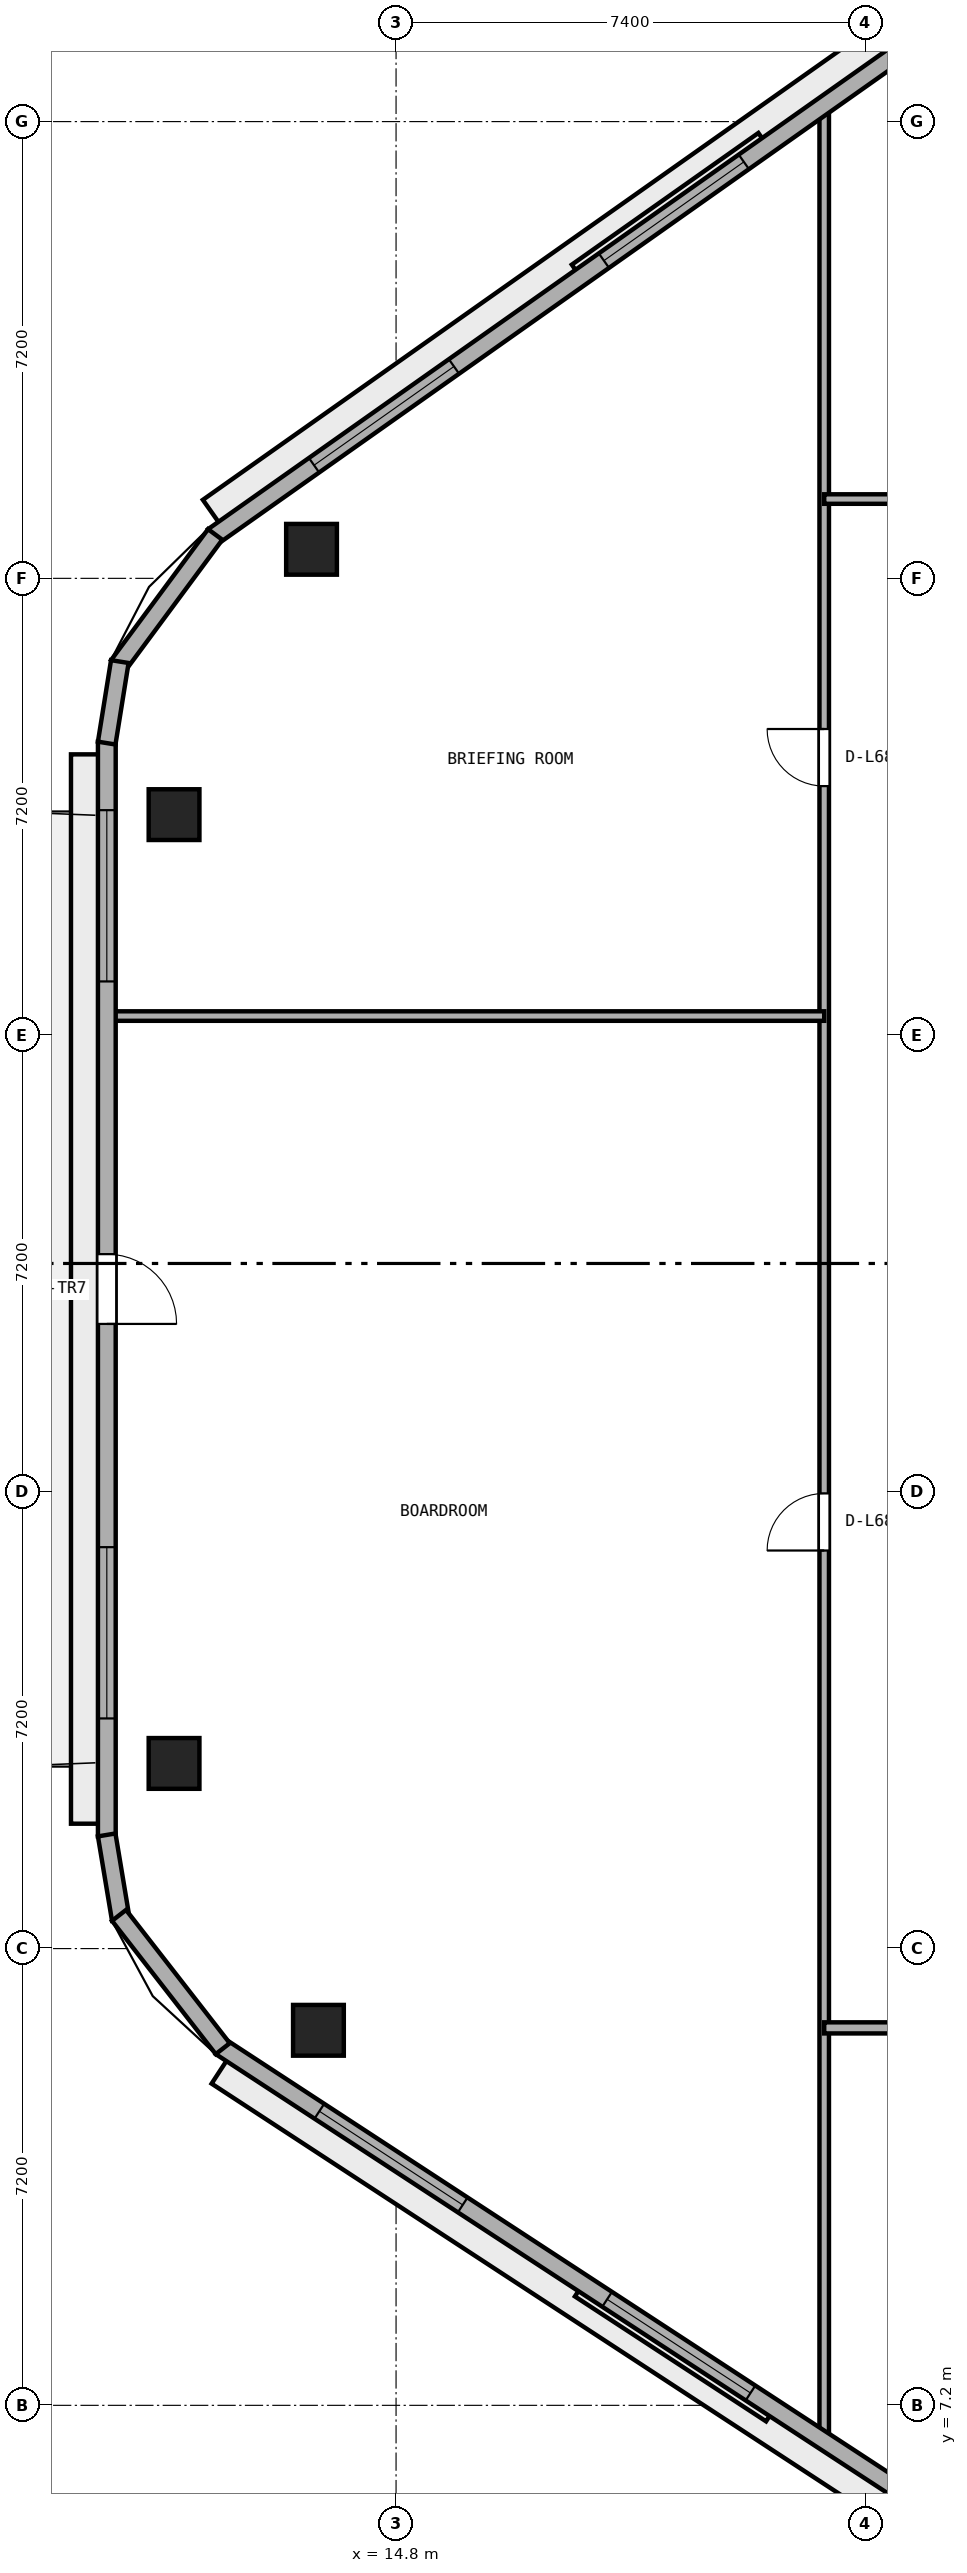
"""IFC4 building model, lengths in metres.
Left out: names, types, materials, properties, quantities, classifications, styles, units other than length and angle.
Written with IfcOpenShell. Run it as: python <this file> out.ifc"""

import sys

from ifc_helpers import new_model, si_unit, direction, frame, frame_2d, origin, origin_2d, place, context, subcontext, project, spatial, rectangle, extrude, element, fill, save


model = new_model("IFC4")
c1 = context("Model", 3, precision=1e-05, world=origin(), true_north=direction((0.0, 1.0)))
c2 = subcontext(c1, "Body", "Model", "MODEL_VIEW")
j1 = project(units=[si_unit("LENGTHUNIT", "METRE"), si_unit("PLANEANGLEUNIT", "RADIAN")], contexts=[c1])
p1 = place(None, origin())
s1 = spatial("IfcSite", under=j1, at=p1, CompositionType="ELEMENT")
p2 = place(p1, origin())
s2 = spatial("IfcBuilding", under=s1, at=p2, CompositionType="ELEMENT")
p3 = place(p2, frame((0.0, 0.0, 266.8)))
s3 = spatial("IfcBuildingStorey", under=s2, at=p3, CompositionType="ELEMENT", Elevation=266.8)
for number, where, z_axis, x_axis in (
    (1, (13.467, 36.458, 0.0), (0.0, 0.0, 1.0), (1.0, 0.0, 0.0)),
    (2, (11.3, 32.275, 0.0), (0.0, 0.0, 1.0), (1.0, 0.0, 0.0)),
    (3, (11.3, 17.319, 0.0), (0.0, 0.0, 1.0), (1.0, 0.0, 0.0)),
    (4, (13.576, 13.112, 0.0), (0.0, 0.0, 1.0), (1.0, 0.0, 0.0)),
):
    element("IfcColumn", number, at=place(p3, frame(where, z_axis=z_axis, x_axis=x_axis)), inside=s3, PredefinedType="COLUMN", context=c2, shape_type="SweptSolid", body=[
        extrude(rectangle(XDim=0.8, YDim=0.8, at=origin_2d()), origin(), (0.0, 0.0, 1.0), 3.8),
    ])
p4 = place(p3, frame((21.55, 6.608, 0.0), z_axis=(0.0, 0.0, 1.0), x_axis=(0.0, 1.0, 0.0)))
e5 = element("IfcWall", 5, at=p4, inside=s3, PredefinedType="PARTITIONING", context=c2, shape_type="SweptSolid", body=[
    extrude(rectangle(XDim=36.883, YDim=0.15, at=frame_2d((18.441, 0.0))), origin(), (0.0, 0.0, 1.0), 3.51),
])
p5 = place(p4, frame((14.067, 0.0, 0.0)))
e6 = element("IfcOpeningElement", 6, at=p5, cuts=e5, PredefinedType="OPENING", context=c2, shape_type="SweptSolid", body=[
    extrude(rectangle(XDim=0.9, YDim=2.1, at=frame_2d((0.45, 1.05))), frame((0.0, 0.085, 0.0), z_axis=(0.0, -1.0, 0.0), x_axis=(1.0, 0.0, 0.0)), (0.0, 0.0, 1.0), 0.17),
])
p6 = place(p4, frame((26.117, 0.0, 0.0)))
e7 = element("IfcOpeningElement", 7, at=p6, cuts=e5, PredefinedType="OPENING", context=c2, shape_type="SweptSolid", body=[
    extrude(rectangle(XDim=0.9, YDim=2.1, at=frame_2d((0.45, 1.05))), frame((0.0, 0.085, 0.0), z_axis=(0.0, -1.0, 0.0), x_axis=(1.0, 0.0, 0.0)), (0.0, 0.0, 1.0), 0.17),
])
p7 = place(p3, frame((21.55, 13.15, 0.0), z_axis=(0.0, 0.0, 1.0), x_axis=(1.0, 0.0, 0.0)))
e8 = element("IfcWall", 8, at=p7, inside=s3, PredefinedType="PARTITIONING", context=c2, shape_type="SweptSolid", body=[
    extrude(rectangle(XDim=14.1, YDim=0.175, at=frame_2d((7.05, 0.0))), origin(), (0.0, 0.0, 1.0), 3.51),
])
p8 = place(p7, frame((6.6, 0.0, 0.0)))
e9 = element("IfcOpeningElement", 9, at=p8, cuts=e8, PredefinedType="OPENING", context=c2, shape_type="SweptSolid", body=[
    extrude(rectangle(XDim=0.9, YDim=2.1, at=frame_2d((0.45, 1.05))), frame((0.0, 0.097, 0.0), z_axis=(0.0, -1.0, 0.0), x_axis=(1.0, 0.0, 0.0)), (0.0, 0.0, 1.0), 0.195),
])
p9 = place(p3, frame((10.305, 29.1, 0.0), z_axis=(0.0, 0.0, 1.0), x_axis=(1.0, 0.0, 0.0)))
e10 = element("IfcWall", 10, at=p9, inside=s3, PredefinedType="PARTITIONING", context=c2, shape_type="SweptSolid", body=[
    extrude(rectangle(XDim=11.245, YDim=0.15, at=frame_2d((5.623, 0.0))), origin(), (0.0, 0.0, 1.0), 3.51),
])
p10 = place(p3, frame((21.55, 37.25, 0.0), z_axis=(0.0, 0.0, 1.0), x_axis=(1.0, 0.0, 0.0)))
e11 = element("IfcWall", 11, at=p10, inside=s3, PredefinedType="PARTITIONING", context=c2, shape_type="SweptSolid", body=[
    extrude(rectangle(XDim=27.05, YDim=0.15, at=frame_2d((13.525, 0.0))), origin(), (0.0, 0.0, 1.0), 3.51),
])
p11 = place(p10, frame((4.795, 0.0, 0.0)))
e12 = element("IfcOpeningElement", 12, at=p11, cuts=e11, PredefinedType="OPENING", context=c2, shape_type="SweptSolid", body=[
    extrude(rectangle(XDim=1.0, YDim=2.12, at=frame_2d((0.5, 1.06))), frame((0.0, 0.085, 0.0), z_axis=(0.0, -1.0, 0.0), x_axis=(1.0, 0.0, 0.0)), (0.0, 0.0, 1.0), 0.17),
])
p12 = place(p10, frame((15.6, 0.0, 0.0)))
e13 = element("IfcOpeningElement", 13, at=p12, cuts=e11, PredefinedType="OPENING", context=c2, shape_type="SweptSolid", body=[
    extrude(rectangle(XDim=1.0, YDim=2.12, at=frame_2d((0.5, 1.06))), frame((0.0, 0.085, 0.0), z_axis=(0.0, -1.0, 0.0), x_axis=(1.0, 0.0, 0.0)), (0.0, 0.0, 1.0), 0.17),
])
p13 = place(p10, frame((23.88, 0.0, 0.0)))
e14 = element("IfcOpeningElement", 14, at=p13, cuts=e11, PredefinedType="OPENING", context=c2, shape_type="SweptSolid", body=[
    extrude(rectangle(XDim=0.9, YDim=2.1, at=frame_2d((0.45, 1.05))), frame((0.0, 0.085, 0.0), z_axis=(0.0, -1.0, 0.0), x_axis=(1.0, 0.0, 0.0)), (0.0, 0.0, 1.0), 0.17),
])
p14 = place(p3, frame((26.443, 46.913, 0.0), z_axis=(0.0, 0.0, 1.0), x_axis=(-0.817024179766, -0.576603407619, 0.0)))
e15 = element("IfcWall", 15, at=p14, inside=s3, PredefinedType="STANDARD", context=c2, shape_type="SweptSolid", body=[
    extrude(rectangle(XDim=17.78, YDim=0.28, at=frame_2d((8.89, 0.0))), origin(), (0.0, 0.0, 1.0), 3.51),
])
p15 = place(p14, frame((1.947, 0.0, 0.9)))
e16 = element("IfcOpeningElement", 16, at=p15, cuts=e15, PredefinedType="OPENING", context=c2, shape_type="SweptSolid", body=[
    extrude(rectangle(XDim=2.7, YDim=1.75, at=frame_2d((1.35, 0.875))), frame((0.0, 0.15, 0.0), z_axis=(0.0, -1.0, 0.0), x_axis=(1.0, 0.0, 0.0)), (0.0, 0.0, 1.0), 0.3),
])
p16 = place(p14, frame((7.54, 0.0, 0.9)))
e17 = element("IfcOpeningElement", 17, at=p16, cuts=e15, PredefinedType="OPENING", context=c2, shape_type="SweptSolid", body=[
    extrude(rectangle(XDim=2.7, YDim=1.75, at=frame_2d((1.35, 0.875))), frame((0.0, 0.15, 0.0), z_axis=(0.0, -1.0, 0.0), x_axis=(1.0, 0.0, 0.0)), (0.0, 0.0, 1.0), 0.3),
])
p17 = place(p14, frame((13.133, 0.0, 0.9)))
e18 = element("IfcOpeningElement", 18, at=p17, cuts=e15, PredefinedType="OPENING", context=c2, shape_type="SweptSolid", body=[
    extrude(rectangle(XDim=2.7, YDim=1.75, at=frame_2d((1.35, 0.875))), frame((0.0, 0.15, 0.0), z_axis=(0.0, -1.0, 0.0), x_axis=(1.0, 0.0, 0.0)), (0.0, 0.0, 1.0), 0.3),
])
p18 = place(p3, frame((10.24, 33.425, 0.0), z_axis=(0.0, 0.0, 1.0), x_axis=(0.0, -1.0, 0.0)))
e19 = element("IfcWall", 19, at=p18, inside=s3, PredefinedType="STANDARD", context=c2, shape_type="SweptSolid", body=[
    extrude(rectangle(XDim=17.257, YDim=0.28, at=frame_2d((8.628, 0.0))), origin(), (0.0, 0.0, 1.0), 3.51),
])
p19 = place(p18, frame((8.078, 0.0, 0.0)))
e20 = element("IfcOpeningElement", 20, at=p19, cuts=e19, PredefinedType="OPENING", context=c2, shape_type="SweptSolid", body=[
    extrude(rectangle(XDim=1.1, YDim=2.2, at=frame_2d((0.55, 1.1))), frame((0.0, 0.15, 0.0), z_axis=(0.0, -1.0, 0.0), x_axis=(1.0, 0.0, 0.0)), (0.0, 0.0, 1.0), 0.3),
])
p20 = place(p18, frame((1.079, 0.0, 0.9)))
e21 = element("IfcOpeningElement", 21, at=p20, cuts=e19, PredefinedType="OPENING", context=c2, shape_type="SweptSolid", body=[
    extrude(rectangle(XDim=2.7, YDim=1.75, at=frame_2d((1.35, 0.875))), frame((0.0, 0.15, 0.0), z_axis=(0.0, -1.0, 0.0), x_axis=(1.0, 0.0, 0.0)), (0.0, 0.0, 1.0), 0.3),
])
p21 = place(p18, frame((12.697, 0.0, 0.9)))
e22 = element("IfcOpeningElement", 22, at=p21, cuts=e19, PredefinedType="OPENING", context=c2, shape_type="SweptSolid", body=[
    extrude(rectangle(XDim=2.7, YDim=1.75, at=frame_2d((1.35, 0.875))), frame((0.0, 0.15, 0.0), z_axis=(0.0, -1.0, 0.0), x_axis=(1.0, 0.0, 0.0)), (0.0, 0.0, 1.0), 0.3),
])
p22 = place(p3, frame((12.034, 12.854, 0.0), z_axis=(0.0, 0.0, 1.0), x_axis=(0.837118352984, -0.547021812269, 0.0)))
e23 = element("IfcWall", 23, at=p22, inside=s3, PredefinedType="STANDARD", context=c2, shape_type="SweptSolid", body=[
    extrude(rectangle(XDim=17.259, YDim=0.28, at=frame_2d((8.63, 0.0))), origin(), (0.0, 0.0, 1.0), 3.51),
])
p23 = place(p22, frame((1.86, 0.0, 0.9)))
e24 = element("IfcOpeningElement", 24, at=p23, cuts=e23, PredefinedType="OPENING", context=c2, shape_type="SweptSolid", body=[
    extrude(rectangle(XDim=2.7, YDim=1.75, at=frame_2d((1.35, 0.875))), frame((0.0, 0.15, 0.0), z_axis=(0.0, -1.0, 0.0), x_axis=(1.0, 0.0, 0.0)), (0.0, 0.0, 1.0), 0.3),
])
p24 = place(p22, frame((7.28, 0.0, 0.9)))
e25 = element("IfcOpeningElement", 25, at=p24, cuts=e23, PredefinedType="OPENING", context=c2, shape_type="SweptSolid", body=[
    extrude(rectangle(XDim=2.7, YDim=1.75, at=frame_2d((1.35, 0.875))), frame((0.0, 0.15, 0.0), z_axis=(0.0, -1.0, 0.0), x_axis=(1.0, 0.0, 0.0)), (0.0, 0.0, 1.0), 0.3),
])
p25 = place(p22, frame((12.699, 0.0, 0.9)))
e26 = element("IfcOpeningElement", 26, at=p25, cuts=e23, PredefinedType="OPENING", context=c2, shape_type="SweptSolid", body=[
    extrude(rectangle(XDim=2.7, YDim=1.75, at=frame_2d((1.35, 0.875))), frame((0.0, 0.15, 0.0), z_axis=(0.0, -1.0, 0.0), x_axis=(1.0, 0.0, 0.0)), (0.0, 0.0, 1.0), 0.3),
])
p26 = place(p3, frame((11.948, 36.692, 0.0), z_axis=(0.0, 0.0, 1.0), x_axis=(-0.595170751493, -0.803599263668, 0.0)))
e27 = element("IfcWall", 27, at=p26, inside=s3, PredefinedType="STANDARD", context=c2, shape_type="SweptSolid", body=[
    extrude(rectangle(XDim=2.57, YDim=0.28, at=frame_2d((1.285, 0.0))), origin(), (0.0, 0.0, 1.0), 3.51),
])
p27 = place(p3, frame((10.445, 34.688, 0.0), z_axis=(0.0, 0.0, 1.0), x_axis=(-0.158524605336, -0.987355027081, 0.0)))
e28 = element("IfcWall", 28, at=p27, inside=s3, PredefinedType="STANDARD", context=c2, shape_type="SweptSolid", body=[
    extrude(rectangle(XDim=1.301, YDim=0.28, at=frame_2d((0.651, 0.0))), origin(), (0.0, 0.0, 1.0), 3.51),
])
p28 = place(p3, frame((10.238, 16.192, 0.0), z_axis=(0.0, 0.0, 1.0), x_axis=(0.164604311367, -0.986359681191, 0.0)))
e29 = element("IfcWall", 29, at=p28, inside=s3, PredefinedType="STANDARD", context=c2, shape_type="SweptSolid", body=[
    extrude(rectangle(XDim=1.35, YDim=0.28, at=frame_2d((0.675, 0.0))), origin(), (0.0, 0.0, 1.0), 3.51),
])
p29 = place(p3, frame((10.433, 14.923, 0.0), z_axis=(0.0, 0.0, 1.0), x_axis=(0.614181852676, -0.78916452774, 0.0)))
e30 = element("IfcWall", 30, at=p29, inside=s3, PredefinedType="STANDARD", context=c2, shape_type="SweptSolid", body=[
    extrude(rectangle(XDim=2.662, YDim=0.28, at=frame_2d((1.331, 0.0))), origin(), (0.0, 0.0, 1.0), 3.51),
])
p30 = place(p5, origin())
e31 = element("IfcDoor", 31, at=p30, inside=s3, OperationType="SINGLE_SWING_LEFT", PredefinedType="DOOR", context=c2, shape_type="SweptSolid", body=[
    extrude(rectangle(XDim=0.9, YDim=2.1, at=frame_2d((0.45, 1.05))), frame((0.0, 0.025, 0.0), z_axis=(0.0, -1.0, 0.0), x_axis=(1.0, 0.0, 0.0)), (0.0, 0.0, 1.0), 0.05),
])
fill(e6, e31)
p31 = place(p6, origin())
e32 = element("IfcDoor", 32, at=p31, inside=s3, OperationType="SINGLE_SWING_RIGHT", PredefinedType="DOOR", context=c2, shape_type="SweptSolid", body=[
    extrude(rectangle(XDim=0.9, YDim=2.1, at=frame_2d((0.45, 1.05))), frame((0.0, 0.025, 0.0), z_axis=(0.0, -1.0, 0.0), x_axis=(1.0, 0.0, 0.0)), (0.0, 0.0, 1.0), 0.05),
])
fill(e7, e32)
p32 = place(p16, origin())
e33 = element("IfcWindow", 33, at=p32, inside=s3, PartitioningType="SINGLE_PANEL", PredefinedType="WINDOW", context=c2, shape_type="SweptSolid", body=[
    extrude(rectangle(XDim=2.7, YDim=1.75, at=frame_2d((1.35, 0.875))), frame((0.0, 0.03, 0.0), z_axis=(0.0, -1.0, 0.0), x_axis=(1.0, 0.0, 0.0)), (0.0, 0.0, 1.0), 0.06),
])
fill(e17, e33)
p33 = place(p17, origin())
e34 = element("IfcWindow", 34, at=p33, inside=s3, PartitioningType="SINGLE_PANEL", PredefinedType="WINDOW", context=c2, shape_type="SweptSolid", body=[
    extrude(rectangle(XDim=2.7, YDim=1.75, at=frame_2d((1.35, 0.875))), frame((0.0, 0.03, 0.0), z_axis=(0.0, -1.0, 0.0), x_axis=(1.0, 0.0, 0.0)), (0.0, 0.0, 1.0), 0.06),
])
fill(e18, e34)
p34 = place(p19, origin())
e35 = element("IfcDoor", 35, at=p34, inside=s3, OperationType="SINGLE_SWING_RIGHT", PredefinedType="DOOR", context=c2, shape_type="SweptSolid", body=[
    extrude(rectangle(XDim=1.1, YDim=2.2, at=frame_2d((0.55, 1.1))), frame((0.0, 0.025, 0.0), z_axis=(0.0, -1.0, 0.0), x_axis=(1.0, 0.0, 0.0)), (0.0, 0.0, 1.0), 0.05),
])
fill(e20, e35)
p35 = place(p20, origin())
e36 = element("IfcWindow", 36, at=p35, inside=s3, PartitioningType="SINGLE_PANEL", PredefinedType="WINDOW", context=c2, shape_type="SweptSolid", body=[
    extrude(rectangle(XDim=2.7, YDim=1.75, at=frame_2d((1.35, 0.875))), frame((0.0, 0.03, 0.0), z_axis=(0.0, -1.0, 0.0), x_axis=(1.0, 0.0, 0.0)), (0.0, 0.0, 1.0), 0.06),
])
fill(e21, e36)
p36 = place(p21, origin())
e37 = element("IfcWindow", 37, at=p36, inside=s3, PartitioningType="SINGLE_PANEL", PredefinedType="WINDOW", context=c2, shape_type="SweptSolid", body=[
    extrude(rectangle(XDim=2.7, YDim=1.75, at=frame_2d((1.35, 0.875))), frame((0.0, 0.03, 0.0), z_axis=(0.0, -1.0, 0.0), x_axis=(1.0, 0.0, 0.0)), (0.0, 0.0, 1.0), 0.06),
])
fill(e22, e37)
p37 = place(p23, origin())
e38 = element("IfcWindow", 38, at=p37, inside=s3, PartitioningType="SINGLE_PANEL", PredefinedType="WINDOW", context=c2, shape_type="SweptSolid", body=[
    extrude(rectangle(XDim=2.7, YDim=1.75, at=frame_2d((1.35, 0.875))), frame((0.0, 0.03, 0.0), z_axis=(0.0, -1.0, 0.0), x_axis=(1.0, 0.0, 0.0)), (0.0, 0.0, 1.0), 0.06),
])
fill(e24, e38)
p38 = place(p24, origin())
e39 = element("IfcWindow", 39, at=p38, inside=s3, PartitioningType="SINGLE_PANEL", PredefinedType="WINDOW", context=c2, shape_type="SweptSolid", body=[
    extrude(rectangle(XDim=2.7, YDim=1.75, at=frame_2d((1.35, 0.875))), frame((0.0, 0.03, 0.0), z_axis=(0.0, -1.0, 0.0), x_axis=(1.0, 0.0, 0.0)), (0.0, 0.0, 1.0), 0.06),
])
fill(e25, e39)
save(model, sys.argv[1])
